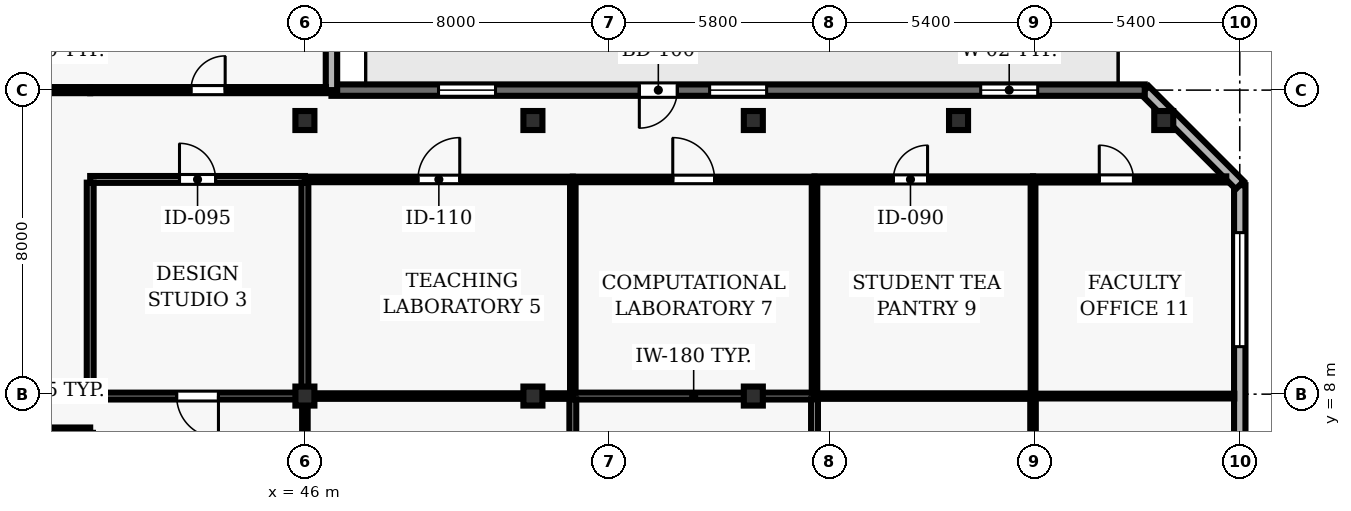
"""IFC4 building model, lengths in metres.
Left out: names, types, materials, properties, quantities, classifications, styles, units other than length and angle.
Written with IfcOpenShell. Run it as: python <this file> out.ifc"""

import sys

from ifc_helpers import new_model, si_unit, direction, frame, frame_2d, origin, origin_2d, place, context, subcontext, project, spatial, rectangle, hollow_rectangle, extrude, element, fill, save


model = new_model("IFC4")
c1 = context("Model", 3, precision=1e-05, world=origin(), true_north=direction((0.0, 1.0)))
c2 = subcontext(c1, "Body", "Model", "MODEL_VIEW")
j1 = project(units=[si_unit("LENGTHUNIT", "METRE"), si_unit("PLANEANGLEUNIT", "RADIAN")], contexts=[c1])
p1 = place(None, origin())
s1 = spatial("IfcSite", under=j1, at=p1, CompositionType="ELEMENT")
p2 = place(p1, origin())
s2 = spatial("IfcBuilding", under=s1, at=p2, CompositionType="ELEMENT")
p3 = place(p2, frame((0.0, 0.0, 138.5)))
s3 = spatial("IfcBuildingStorey", under=s2, at=p3, CompositionType="ELEMENT", Elevation=138.5)
for number, where, z_axis, x_axis in (
    (1, (46.0, 7.95, 0.0), (0.0, 0.0, 1.0), (1.0, 0.0, 0.0)),
    (2, (46.0, 15.2, 0.0), (0.0, 0.0, 1.0), (1.0, 0.0, 0.0)),
    (3, (52.0, 7.95, 0.0), (0.0, 0.0, 1.0), (1.0, 0.0, 0.0)),
    (4, (52.0, 15.2, 0.0), (0.0, 0.0, 1.0), (1.0, 0.0, 0.0)),
    (5, (57.8, 7.95, 0.0), (0.0, 0.0, 1.0), (1.0, 0.0, 0.0)),
    (6, (57.8, 15.2, 0.0), (0.0, 0.0, 1.0), (1.0, 0.0, 0.0)),
    (7, (63.2, 15.2, 0.0), (0.0, 0.0, 1.0), (1.0, 0.0, 0.0)),
    (8, (68.6, 15.2, 0.0), (0.0, 0.0, 1.0), (1.0, 0.0, 0.0)),
):
    element("IfcColumn", number, at=place(p3, frame(where, z_axis=z_axis, x_axis=x_axis)), inside=s3, PredefinedType="COLUMN", context=c2, shape_type="SweptSolid", body=[
        extrude(hollow_rectangle(XDim=0.5, YDim=0.5, WallThickness=0.025, at=origin_2d()), origin(), (0.0, 0.0, 1.0), 3.9),
    ])
p4 = place(p3, frame((70.6, 2.5, 0.0), z_axis=(0.0, 0.0, 1.0), x_axis=(0.0, 1.0, 0.0)))
e9 = element("IfcWall", 9, at=p4, inside=s3, PredefinedType="SOLIDWALL", context=c2, shape_type="SweptSolid", body=[
    extrude(rectangle(XDim=11.0, YDim=0.3, at=frame_2d((5.5, 0.0))), origin(), (0.0, 0.0, 1.0), 3.69),
])
p5 = place(p4, frame((1.25, 0.0, 0.9)))
e10 = element("IfcOpeningElement", 10, at=p5, cuts=e9, PredefinedType="OPENING", context=c2, shape_type="SweptSolid", body=[
    extrude(rectangle(XDim=3.0, YDim=2.2, at=frame_2d((1.5, 1.1))), frame((0.0, 0.16, 0.0), z_axis=(0.0, -1.0, 0.0), x_axis=(1.0, 0.0, 0.0)), (0.0, 0.0, 1.0), 0.32),
])
p6 = place(p4, frame((6.75, 0.0, 0.9)))
e11 = element("IfcOpeningElement", 11, at=p6, cuts=e9, PredefinedType="OPENING", context=c2, shape_type="SweptSolid", body=[
    extrude(rectangle(XDim=3.0, YDim=2.2, at=frame_2d((1.5, 1.1))), frame((0.0, 0.16, 0.0), z_axis=(0.0, -1.0, 0.0), x_axis=(1.0, 0.0, 0.0)), (0.0, 0.0, 1.0), 0.32),
])
p7 = place(p3, frame((70.6, 13.5, 0.0), z_axis=(0.0, 0.0, 1.0), x_axis=(-0.707106781187, 0.707106781187, 0.0)))
e12 = element("IfcWall", 12, at=p7, inside=s3, PredefinedType="SOLIDWALL", context=c2, shape_type="SweptSolid", body=[
    extrude(rectangle(XDim=3.536, YDim=0.3, at=frame_2d((1.768, 0.0))), origin(), (0.0, 0.0, 1.0), 3.69),
])
p8 = place(p3, frame((68.1, 16.0, 0.0), z_axis=(0.0, 0.0, 1.0), x_axis=(-1.0, 0.0, 0.0)))
e13 = element("IfcWall", 13, at=p8, inside=s3, PredefinedType="SOLIDWALL", context=c2, shape_type="SweptSolid", body=[
    extrude(rectangle(XDim=21.401, YDim=0.3, at=frame_2d((10.701, 0.0))), origin(), (0.0, 0.0, 1.0), 3.69),
])
p9 = place(p8, frame((12.3, 0.0, 0.0)))
e14 = element("IfcOpeningElement", 14, at=p9, cuts=e13, PredefinedType="OPENING", context=c2, shape_type="SweptSolid", body=[
    extrude(rectangle(XDim=1.0, YDim=2.2, at=frame_2d((0.5, 1.1))), frame((0.0, 0.16, 0.0), z_axis=(0.0, -1.0, 0.0), x_axis=(1.0, 0.0, 0.0)), (0.0, 0.0, 1.0), 0.32),
])
p10 = place(p8, frame((2.817, 0.0, 0.9)))
e15 = element("IfcOpeningElement", 15, at=p10, cuts=e13, PredefinedType="OPENING", context=c2, shape_type="SweptSolid", body=[
    extrude(rectangle(XDim=1.5, YDim=1.6, at=frame_2d((0.75, 0.8))), frame((0.0, 0.16, 0.0), z_axis=(0.0, -1.0, 0.0), x_axis=(1.0, 0.0, 0.0)), (0.0, 0.0, 1.0), 0.32),
])
p11 = place(p8, frame((9.95, 0.0, 0.9)))
e16 = element("IfcOpeningElement", 16, at=p11, cuts=e13, PredefinedType="OPENING", context=c2, shape_type="SweptSolid", body=[
    extrude(rectangle(XDim=1.5, YDim=1.6, at=frame_2d((0.75, 0.8))), frame((0.0, 0.16, 0.0), z_axis=(0.0, -1.0, 0.0), x_axis=(1.0, 0.0, 0.0)), (0.0, 0.0, 1.0), 0.32),
])
p12 = place(p8, frame((17.084, 0.0, 0.9)))
e17 = element("IfcOpeningElement", 17, at=p12, cuts=e13, PredefinedType="OPENING", context=c2, shape_type="SweptSolid", body=[
    extrude(rectangle(XDim=1.5, YDim=1.6, at=frame_2d((0.75, 0.8))), frame((0.0, 0.16, 0.0), z_axis=(0.0, -1.0, 0.0), x_axis=(1.0, 0.0, 0.0)), (0.0, 0.0, 1.0), 0.32),
])
p13 = place(p3, frame((46.699, 16.0, 0.0), z_axis=(0.0, 0.0, 1.0), x_axis=(0.0, 1.0, 0.0)))
e18 = element("IfcWall", 18, at=p13, inside=s3, PredefinedType="SOLIDWALL", context=c2, shape_type="SweptSolid", body=[
    extrude(rectangle(XDim=9.25, YDim=0.3, at=frame_2d((4.625, 0.0))), origin(), (0.0, 0.0, 1.0), 3.69),
])
p14 = place(p13, frame((3.725, 0.0, 0.9)))
e19 = element("IfcOpeningElement", 19, at=p14, cuts=e18, PredefinedType="OPENING", context=c2, shape_type="SweptSolid", body=[
    extrude(rectangle(XDim=1.8, YDim=1.6, at=frame_2d((0.9, 0.8))), frame((0.0, 0.16, 0.0), z_axis=(0.0, -1.0, 0.0), x_axis=(1.0, 0.0, 0.0)), (0.0, 0.0, 1.0), 0.32),
])
p15 = place(p3, frame((38.05, 7.05, 0.0), z_axis=(0.0, 0.0, 1.0), x_axis=(1.0, 0.0, 0.0)))
e20 = element("IfcWall", 20, at=p15, inside=s3, PredefinedType="PARTITIONING", context=c2, shape_type="SweptSolid", body=[
    extrude(rectangle(XDim=2.3, YDim=0.145, at=frame_2d((1.15, 0.0))), origin(), (0.0, 0.0, 1.0), 3.69),
])
p16 = place(p3, frame((40.35, 13.65, 0.0), z_axis=(0.0, 0.0, 1.0), x_axis=(1.0, 0.0, 0.0)))
e21 = element("IfcWall", 21, at=p16, inside=s3, PredefinedType="PARTITIONING", context=c2, shape_type="SweptSolid", body=[
    extrude(rectangle(XDim=5.65, YDim=0.18, at=frame_2d((2.825, 0.0))), origin(), (0.0, 0.0, 1.0), 3.69),
])
p17 = place(p16, frame((2.35, 0.0, 0.0)))
e22 = element("IfcOpeningElement", 22, at=p17, cuts=e21, PredefinedType="OPENING", context=c2, shape_type="SweptSolid", body=[
    extrude(rectangle(XDim=0.95, YDim=2.1, at=frame_2d((0.475, 1.05))), frame((0.0, 0.1, 0.0), z_axis=(0.0, -1.0, 0.0), x_axis=(1.0, 0.0, 0.0)), (0.0, 0.0, 1.0), 0.2),
])
p18 = place(p3, frame((40.35, 16.0, 0.0), z_axis=(0.0, 0.0, 1.0), x_axis=(-1.0, 0.0, 0.0)))
e23 = element("IfcWall", 23, at=p18, inside=s3, PredefinedType="PARTITIONING", context=c2, shape_type="SweptSolid", body=[
    extrude(rectangle(XDim=2.3, YDim=0.16, at=frame_2d((1.15, 0.0))), origin(), (0.0, 0.0, 1.0), 3.69),
])
p19 = place(p3, frame((40.35, 16.0, 0.0), z_axis=(0.0, 0.0, 1.0), x_axis=(1.0, 0.0, 0.0)))
e24 = element("IfcWall", 24, at=p19, inside=s3, PredefinedType="PARTITIONING", context=c2, shape_type="SweptSolid", body=[
    extrude(rectangle(XDim=6.204, YDim=0.16, at=frame_2d((3.102, 0.0))), origin(), (0.0, 0.0, 1.0), 3.39),
])
p20 = place(p19, frame((2.652, 0.0, 0.0)))
e25 = element("IfcOpeningElement", 25, at=p20, cuts=e24, PredefinedType="OPENING", context=c2, shape_type="SweptSolid", body=[
    extrude(rectangle(XDim=0.9, YDim=2.1, at=frame_2d((0.45, 1.05))), frame((0.0, 0.09, 0.0), z_axis=(0.0, -1.0, 0.0), x_axis=(1.0, 0.0, 0.0)), (0.0, 0.0, 1.0), 0.18),
])
p21 = place(p3, frame((46.0, 7.95, 0.0), z_axis=(0.0, 0.0, 1.0), x_axis=(-1.0, 0.0, 0.0)))
e26 = element("IfcWall", 26, at=p21, inside=s3, PredefinedType="PARTITIONING", context=c2, shape_type="SweptSolid", body=[
    extrude(rectangle(XDim=5.65, YDim=0.18, at=frame_2d((2.825, 0.0))), origin(), (0.0, 0.0, 1.0), 3.073),
])
p22 = place(p21, frame((2.275, 0.0, 0.0)))
e27 = element("IfcOpeningElement", 27, at=p22, cuts=e26, PredefinedType="OPENING", context=c2, shape_type="SweptSolid", body=[
    extrude(rectangle(XDim=1.1, YDim=2.15, at=frame_2d((0.55, 1.075))), frame((0.0, 0.1, 0.0), z_axis=(0.0, -1.0, 0.0), x_axis=(1.0, 0.0, 0.0)), (0.0, 0.0, 1.0), 0.2),
])
p23 = place(p3, frame((46.0, 13.65, 0.0), z_axis=(0.0, 0.0, 1.0), x_axis=(1.0, 0.0, 0.0)))
e28 = element("IfcWall", 28, at=p23, inside=s3, PredefinedType="PARTITIONING", context=c2, shape_type="SweptSolid", body=[
    extrude(rectangle(XDim=7.05, YDim=0.145, at=frame_2d((3.525, 0.0))), origin(), (0.0, 0.0, 1.0), 3.69),
])
p24 = place(p23, frame((2.975, 0.0, 0.0)))
e29 = element("IfcOpeningElement", 29, at=p24, cuts=e28, PredefinedType="OPENING", context=c2, shape_type="SweptSolid", body=[
    extrude(rectangle(XDim=1.1, YDim=2.15, at=frame_2d((0.55, 1.075))), frame((0.0, 0.083, 0.0), z_axis=(0.0, -1.0, 0.0), x_axis=(1.0, 0.0, 0.0)), (0.0, 0.0, 1.0), 0.165),
])
p25 = place(p3, frame((53.05, 7.95, 0.0), z_axis=(0.0, 0.0, 1.0), x_axis=(-1.0, 0.0, 0.0)))
e30 = element("IfcWall", 30, at=p25, inside=s3, PredefinedType="PARTITIONING", context=c2, shape_type="SweptSolid", body=[
    extrude(rectangle(XDim=7.05, YDim=0.145, at=frame_2d((3.525, 0.0))), origin(), (0.0, 0.0, 1.0), 3.073),
])
p26 = place(p3, frame((53.05, 13.65, 0.0), z_axis=(0.0, 0.0, 1.0), x_axis=(1.0, 0.0, 0.0)))
e31 = element("IfcWall", 31, at=p26, inside=s3, PredefinedType="PARTITIONING", context=c2, shape_type="SweptSolid", body=[
    extrude(rectangle(XDim=6.36, YDim=0.145, at=frame_2d((3.18, 0.0))), origin(), (0.0, 0.0, 1.0), 3.69),
])
p27 = place(p26, frame((2.63, 0.0, 0.0)))
e32 = element("IfcOpeningElement", 32, at=p27, cuts=e31, PredefinedType="OPENING", context=c2, shape_type="SweptSolid", body=[
    extrude(rectangle(XDim=1.1, YDim=2.15, at=frame_2d((0.55, 1.075))), frame((0.0, 0.083, 0.0), z_axis=(0.0, -1.0, 0.0), x_axis=(1.0, 0.0, 0.0)), (0.0, 0.0, 1.0), 0.165),
])
p28 = place(p3, frame((59.41, 7.95, 0.0), z_axis=(0.0, 0.0, 1.0), x_axis=(-1.0, 0.0, 0.0)))
e33 = element("IfcWall", 33, at=p28, inside=s3, PredefinedType="PARTITIONING", context=c2, shape_type="SweptSolid", body=[
    extrude(rectangle(XDim=6.36, YDim=0.18, at=frame_2d((3.18, 0.0))), origin(), (0.0, 0.0, 1.0), 3.073),
])
p29 = place(p3, frame((59.41, 13.65, 0.0), z_axis=(0.0, 0.0, 1.0), x_axis=(1.0, 0.0, 0.0)))
e34 = element("IfcWall", 34, at=p29, inside=s3, PredefinedType="PARTITIONING", context=c2, shape_type="SweptSolid", body=[
    extrude(rectangle(XDim=5.75, YDim=0.16, at=frame_2d((2.875, 0.0))), origin(), (0.0, 0.0, 1.0), 3.69),
])
p30 = place(p29, frame((2.075, 0.0, 0.0)))
e35 = element("IfcOpeningElement", 35, at=p30, cuts=e34, PredefinedType="OPENING", context=c2, shape_type="SweptSolid", body=[
    extrude(rectangle(XDim=0.9, YDim=2.1, at=frame_2d((0.45, 1.05))), frame((0.0, 0.09, 0.0), z_axis=(0.0, -1.0, 0.0), x_axis=(1.0, 0.0, 0.0)), (0.0, 0.0, 1.0), 0.18),
])
p31 = place(p3, frame((65.16, 7.95, 0.0), z_axis=(0.0, 0.0, 1.0), x_axis=(-1.0, 0.0, 0.0)))
e36 = element("IfcWall", 36, at=p31, inside=s3, PredefinedType="PARTITIONING", context=c2, shape_type="SweptSolid", body=[
    extrude(rectangle(XDim=5.75, YDim=0.145, at=frame_2d((2.875, 0.0))), origin(), (0.0, 0.0, 1.0), 3.69),
])
p32 = place(p3, frame((65.16, 13.65, 0.0), z_axis=(0.0, 0.0, 1.0), x_axis=(1.0, 0.0, 0.0)))
e37 = element("IfcWall", 37, at=p32, inside=s3, PredefinedType="PARTITIONING", context=c2, shape_type="SweptSolid", body=[
    extrude(rectangle(XDim=5.085, YDim=0.16, at=frame_2d((2.542, 0.0))), origin(), (0.0, 0.0, 1.0), 3.69),
])
p33 = place(p32, frame((1.743, 0.0, 0.0)))
e38 = element("IfcOpeningElement", 38, at=p33, cuts=e37, PredefinedType="OPENING", context=c2, shape_type="SweptSolid", body=[
    extrude(rectangle(XDim=0.9, YDim=2.1, at=frame_2d((0.45, 1.05))), frame((0.0, 0.09, 0.0), z_axis=(0.0, -1.0, 0.0), x_axis=(1.0, 0.0, 0.0)), (0.0, 0.0, 1.0), 0.18),
])
p34 = place(p3, frame((70.455, 7.95, 0.0), z_axis=(0.0, 0.0, 1.0), x_axis=(-1.0, 0.0, 0.0)))
e39 = element("IfcWall", 39, at=p34, inside=s3, PredefinedType="PARTITIONING", context=c2, shape_type="SweptSolid", body=[
    extrude(rectangle(XDim=5.295, YDim=0.125, at=frame_2d((2.647, 0.0))), origin(), (0.0, 0.0, 1.0), 3.69),
])
p35 = place(p3, frame((40.35, 8.035, 0.0), z_axis=(0.0, 0.0, 1.0), x_axis=(0.0, 1.0, 0.0)))
e40 = element("IfcWall", 40, at=p35, inside=s3, PredefinedType="PARTITIONING", context=c2, shape_type="SweptSolid", body=[
    extrude(rectangle(XDim=5.53, YDim=0.18, at=frame_2d((2.765, 0.0))), origin(), (0.0, 0.0, 1.0), 3.69),
])
p36 = place(p3, frame((46.0, 0.145, 0.0), z_axis=(0.0, 0.0, 1.0), x_axis=(0.0, 1.0, 0.0)))
e41 = element("IfcWall", 41, at=p36, inside=s3, PredefinedType="PARTITIONING", context=c2, shape_type="SweptSolid", body=[
    extrude(rectangle(XDim=7.72, YDim=0.145, at=frame_2d((3.86, 0.0))), origin(), (0.0, 0.0, 1.0), 3.073),
])
p37 = place(p36, frame((3.31, 0.0, 0.0)))
e42 = element("IfcOpeningElement", 42, at=p37, cuts=e41, PredefinedType="OPENING", context=c2, shape_type="SweptSolid", body=[
    extrude(rectangle(XDim=1.1, YDim=2.15, at=frame_2d((0.55, 1.075))), frame((0.0, 0.083, 0.0), z_axis=(0.0, -1.0, 0.0), x_axis=(1.0, 0.0, 0.0)), (0.0, 0.0, 1.0), 0.165),
])
p38 = place(p3, frame((46.0, 8.035, 0.0), z_axis=(0.0, 0.0, 1.0), x_axis=(0.0, 1.0, 0.0)))
e43 = element("IfcWall", 43, at=p38, inside=s3, PredefinedType="PARTITIONING", context=c2, shape_type="SweptSolid", body=[
    extrude(rectangle(XDim=5.53, YDim=0.18, at=frame_2d((2.765, 0.0))), origin(), (0.0, 0.0, 1.0), 3.073),
])
p39 = place(p3, frame((53.05, 0.145, 0.0), z_axis=(0.0, 0.0, 1.0), x_axis=(0.0, 1.0, 0.0)))
e44 = element("IfcWall", 44, at=p39, inside=s3, PredefinedType="PARTITIONING", context=c2, shape_type="SweptSolid", body=[
    extrude(rectangle(XDim=7.72, YDim=0.18, at=frame_2d((3.86, 0.0))), origin(), (0.0, 0.0, 1.0), 3.69),
])
p40 = place(p39, frame((3.385, 0.0, 0.0)))
e45 = element("IfcOpeningElement", 45, at=p40, cuts=e44, PredefinedType="OPENING", context=c2, shape_type="SweptSolid", body=[
    extrude(rectangle(XDim=0.95, YDim=2.1, at=frame_2d((0.475, 1.05))), frame((0.0, 0.1, 0.0), z_axis=(0.0, -1.0, 0.0), x_axis=(1.0, 0.0, 0.0)), (0.0, 0.0, 1.0), 0.2),
])
p41 = place(p3, frame((53.05, 8.035, 0.0), z_axis=(0.0, 0.0, 1.0), x_axis=(0.0, 1.0, 0.0)))
e46 = element("IfcWall", 46, at=p41, inside=s3, PredefinedType="PARTITIONING", context=c2, shape_type="SweptSolid", body=[
    extrude(rectangle(XDim=5.547, YDim=0.145, at=frame_2d((2.773, 0.0))), origin(), (0.0, 0.0, 1.0), 3.69),
])
p42 = place(p3, frame((59.41, 0.145, 0.0), z_axis=(0.0, 0.0, 1.0), x_axis=(0.0, 1.0, 0.0)))
e47 = element("IfcWall", 47, at=p42, inside=s3, PredefinedType="PARTITIONING", context=c2, shape_type="SweptSolid", body=[
    extrude(rectangle(XDim=7.72, YDim=0.18, at=frame_2d((3.86, 0.0))), origin(), (0.0, 0.0, 1.0), 3.69),
])
p43 = place(p42, frame((3.31, 0.0, 0.0)))
e48 = element("IfcOpeningElement", 48, at=p43, cuts=e47, PredefinedType="OPENING", context=c2, shape_type="SweptSolid", body=[
    extrude(rectangle(XDim=1.1, YDim=2.15, at=frame_2d((0.55, 1.075))), frame((0.0, 0.1, 0.0), z_axis=(0.0, -1.0, 0.0), x_axis=(1.0, 0.0, 0.0)), (0.0, 0.0, 1.0), 0.2),
])
p44 = place(p3, frame((59.41, 8.035, 0.0), z_axis=(0.0, 0.0, 1.0), x_axis=(0.0, 1.0, 0.0)))
e49 = element("IfcWall", 49, at=p44, inside=s3, PredefinedType="PARTITIONING", context=c2, shape_type="SweptSolid", body=[
    extrude(rectangle(XDim=5.54, YDim=0.145, at=frame_2d((2.77, 0.0))), origin(), (0.0, 0.0, 1.0), 3.69),
])
p45 = place(p3, frame((65.16, 0.145, 0.0), z_axis=(0.0, 0.0, 1.0), x_axis=(0.0, 1.0, 0.0)))
e50 = element("IfcWall", 50, at=p45, inside=s3, PredefinedType="PARTITIONING", context=c2, shape_type="SweptSolid", body=[
    extrude(rectangle(XDim=7.738, YDim=0.145, at=frame_2d((3.869, 0.0))), origin(), (0.0, 0.0, 1.0), 3.69),
])
p46 = place(p45, frame((3.419, 0.0, 0.0)))
e51 = element("IfcOpeningElement", 51, at=p46, cuts=e50, PredefinedType="OPENING", context=c2, shape_type="SweptSolid", body=[
    extrude(rectangle(XDim=0.9, YDim=2.1, at=frame_2d((0.45, 1.05))), frame((0.0, 0.083, 0.0), z_axis=(0.0, -1.0, 0.0), x_axis=(1.0, 0.0, 0.0)), (0.0, 0.0, 1.0), 0.165),
])
p47 = place(p3, frame((65.16, 8.018, 0.0), z_axis=(0.0, 0.0, 1.0), x_axis=(0.0, 1.0, 0.0)))
e52 = element("IfcWall", 52, at=p47, inside=s3, PredefinedType="PARTITIONING", context=c2, shape_type="SweptSolid", body=[
    extrude(rectangle(XDim=5.557, YDim=0.125, at=frame_2d((2.778, 0.0))), origin(), (0.0, 0.0, 1.0), 3.69),
])
p48 = place(p6, origin())
e53 = element("IfcWindow", 53, at=p48, inside=s3, PartitioningType="SINGLE_PANEL", PredefinedType="WINDOW", context=c2, shape_type="SweptSolid", body=[
    extrude(rectangle(XDim=3.0, YDim=2.2, at=frame_2d((1.5, 1.1))), frame((0.0, 0.03, 0.0), z_axis=(0.0, -1.0, 0.0), x_axis=(1.0, 0.0, 0.0)), (0.0, 0.0, 1.0), 0.06),
])
fill(e11, e53)
p49 = place(p9, origin())
e54 = element("IfcDoor", 54, at=p49, inside=s3, OperationType="SINGLE_SWING_RIGHT", PredefinedType="DOOR", context=c2, shape_type="SweptSolid", body=[
    extrude(rectangle(XDim=1.0, YDim=2.2, at=frame_2d((0.5, 1.1))), frame((0.0, 0.025, 0.0), z_axis=(0.0, -1.0, 0.0), x_axis=(1.0, 0.0, 0.0)), (0.0, 0.0, 1.0), 0.05),
])
fill(e14, e54)
p50 = place(p10, origin())
e55 = element("IfcWindow", 55, at=p50, inside=s3, PartitioningType="SINGLE_PANEL", PredefinedType="WINDOW", context=c2, shape_type="SweptSolid", body=[
    extrude(rectangle(XDim=1.5, YDim=1.6, at=frame_2d((0.75, 0.8))), frame((0.0, 0.03, 0.0), z_axis=(0.0, -1.0, 0.0), x_axis=(1.0, 0.0, 0.0)), (0.0, 0.0, 1.0), 0.06),
])
fill(e15, e55)
p51 = place(p11, origin())
e56 = element("IfcWindow", 56, at=p51, inside=s3, PartitioningType="SINGLE_PANEL", PredefinedType="WINDOW", context=c2, shape_type="SweptSolid", body=[
    extrude(rectangle(XDim=1.5, YDim=1.6, at=frame_2d((0.75, 0.8))), frame((0.0, 0.03, 0.0), z_axis=(0.0, -1.0, 0.0), x_axis=(1.0, 0.0, 0.0)), (0.0, 0.0, 1.0), 0.06),
])
fill(e16, e56)
p52 = place(p12, origin())
e57 = element("IfcWindow", 57, at=p52, inside=s3, PartitioningType="SINGLE_PANEL", PredefinedType="WINDOW", context=c2, shape_type="SweptSolid", body=[
    extrude(rectangle(XDim=1.5, YDim=1.6, at=frame_2d((0.75, 0.8))), frame((0.0, 0.03, 0.0), z_axis=(0.0, -1.0, 0.0), x_axis=(1.0, 0.0, 0.0)), (0.0, 0.0, 1.0), 0.06),
])
fill(e17, e57)
p53 = place(p17, origin())
e58 = element("IfcDoor", 58, at=p53, inside=s3, OperationType="SINGLE_SWING_LEFT", PredefinedType="DOOR", context=c2, shape_type="SweptSolid", body=[
    extrude(rectangle(XDim=0.95, YDim=2.1, at=frame_2d((0.475, 1.05))), frame((0.0, 0.025, 0.0), z_axis=(0.0, -1.0, 0.0), x_axis=(1.0, 0.0, 0.0)), (0.0, 0.0, 1.0), 0.05),
])
fill(e22, e58)
p54 = place(p24, origin())
e59 = element("IfcDoor", 59, at=p54, inside=s3, OperationType="SINGLE_SWING_RIGHT", PredefinedType="DOOR", context=c2, shape_type="SweptSolid", body=[
    extrude(rectangle(XDim=1.1, YDim=2.15, at=frame_2d((0.55, 1.075))), frame((0.0, 0.025, 0.0), z_axis=(0.0, -1.0, 0.0), x_axis=(1.0, 0.0, 0.0)), (0.0, 0.0, 1.0), 0.05),
])
fill(e29, e59)
p55 = place(p27, origin())
e60 = element("IfcDoor", 60, at=p55, inside=s3, OperationType="SINGLE_SWING_LEFT", PredefinedType="DOOR", context=c2, shape_type="SweptSolid", body=[
    extrude(rectangle(XDim=1.1, YDim=2.15, at=frame_2d((0.55, 1.075))), frame((0.0, 0.025, 0.0), z_axis=(0.0, -1.0, 0.0), x_axis=(1.0, 0.0, 0.0)), (0.0, 0.0, 1.0), 0.05),
])
fill(e32, e60)
p56 = place(p30, origin())
e61 = element("IfcDoor", 61, at=p56, inside=s3, OperationType="SINGLE_SWING_RIGHT", PredefinedType="DOOR", context=c2, shape_type="SweptSolid", body=[
    extrude(rectangle(XDim=0.9, YDim=2.1, at=frame_2d((0.45, 1.05))), frame((0.0, 0.025, 0.0), z_axis=(0.0, -1.0, 0.0), x_axis=(1.0, 0.0, 0.0)), (0.0, 0.0, 1.0), 0.05),
])
fill(e35, e61)
p57 = place(p33, origin())
e62 = element("IfcDoor", 62, at=p57, inside=s3, OperationType="SINGLE_SWING_LEFT", PredefinedType="DOOR", context=c2, shape_type="SweptSolid", body=[
    extrude(rectangle(XDim=0.9, YDim=2.1, at=frame_2d((0.45, 1.05))), frame((0.0, 0.025, 0.0), z_axis=(0.0, -1.0, 0.0), x_axis=(1.0, 0.0, 0.0)), (0.0, 0.0, 1.0), 0.05),
])
fill(e38, e62)
p58 = place(p20, origin())
e63 = element("IfcDoor", 63, at=p58, inside=s3, OperationType="SINGLE_SWING_RIGHT", PredefinedType="DOOR", context=c2, shape_type="SweptSolid", body=[
    extrude(rectangle(XDim=0.9, YDim=2.1, at=frame_2d((0.45, 1.05))), frame((0.0, 0.025, 0.0), z_axis=(0.0, -1.0, 0.0), x_axis=(1.0, 0.0, 0.0)), (0.0, 0.0, 1.0), 0.05),
])
fill(e25, e63)
p59 = place(p22, origin())
e64 = element("IfcDoor", 64, at=p59, inside=s3, OperationType="SINGLE_SWING_LEFT", PredefinedType="DOOR", context=c2, shape_type="SweptSolid", body=[
    extrude(rectangle(XDim=1.1, YDim=2.15, at=frame_2d((0.55, 1.075))), frame((0.0, 0.025, 0.0), z_axis=(0.0, -1.0, 0.0), x_axis=(1.0, 0.0, 0.0)), (0.0, 0.0, 1.0), 0.05),
])
fill(e27, e64)
save(model, sys.argv[1])
